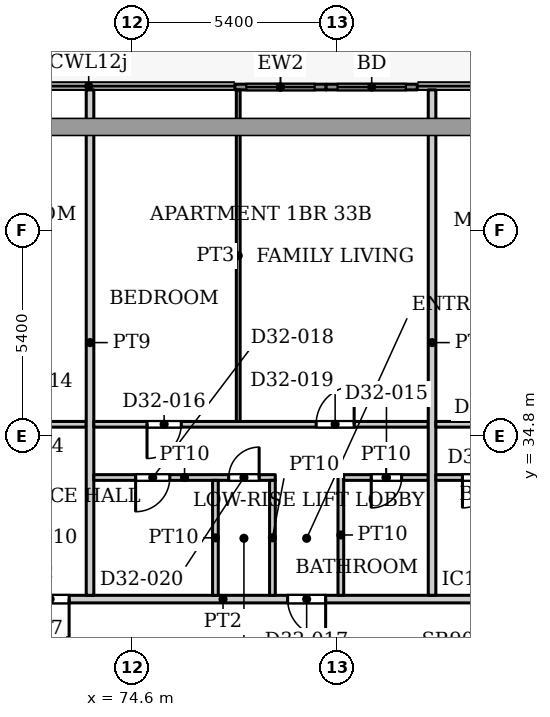
"""IFC4 building model, lengths in metres.
Left out: names, types, materials, properties, quantities, classifications, styles, units other than length and angle.
Written with IfcOpenShell. Run it as: python <this file> out.ifc"""

import sys

from ifc_helpers import new_model, si_unit, direction, frame, frame_2d, origin, place, context, subcontext, project, spatial, rectangle, extrude, source, transform, mapped, element, fill, save


model = new_model("IFC4")
c1 = context("Model", 3, precision=1e-05, world=origin(), true_north=direction((0.0, 1.0)))
c2 = subcontext(c1, "Body", "Model", "MODEL_VIEW")
j1 = project(units=[si_unit("LENGTHUNIT", "METRE"), si_unit("PLANEANGLEUNIT", "RADIAN")], contexts=[c1])
p1 = place(None, origin())
s1 = spatial("IfcSite", under=j1, at=p1, CompositionType="ELEMENT")
p2 = place(p1, origin())
s2 = spatial("IfcBuilding", under=s1, at=p2, CompositionType="ELEMENT")
p3 = place(p2, frame((0.0, 0.0, 140.9)))
s3 = spatial("IfcBuildingStorey", under=s2, at=p3, CompositionType="ELEMENT", Elevation=140.9)
p4 = place(p3, frame((77.312, 43.975, 0.0), z_axis=(0.0, 0.0, 1.0), x_axis=(1.0, 0.0, 0.0)))
e1 = element("IfcWall", 1, at=p4, inside=s3, PredefinedType="SOLIDWALL", context=c2, shape_type="SweptSolid", body=[
    extrude(rectangle(XDim=2.4, YDim=0.15, at=frame_2d((1.2, 0.0))), origin(), (0.0, 0.0, 1.0), 3.75),
])
p5 = place(p4, frame((0.3, 0.0, 0.0)))
e2 = element("IfcOpeningElement", 2, at=p5, cuts=e1, PredefinedType="OPENING", context=c2, shape_type="SweptSolid", body=[
    extrude(rectangle(XDim=1.8, YDim=2.4, at=frame_2d((0.9, 1.2))), frame((0.0, 0.085, 0.0), z_axis=(0.0, -1.0, 0.0), x_axis=(1.0, 0.0, 0.0)), (0.0, 0.0, 1.0), 0.17),
])
p6 = place(p3, frame((79.712, 43.975, 0.0), z_axis=(0.0, 0.0, 1.0), x_axis=(1.0, 0.0, 0.0)))
e3 = element("IfcWall", 3, at=p6, inside=s3, PredefinedType="SOLIDWALL", context=c2, shape_type="SweptSolid", body=[
    extrude(rectangle(XDim=2.4, YDim=0.15, at=frame_2d((1.2, 0.0))), origin(), (0.0, 0.0, 1.0), 3.75),
])
p7 = place(p6, frame((0.3, 0.0, 0.0)))
e4 = element("IfcOpeningElement", 4, at=p7, cuts=e3, PredefinedType="OPENING", context=c2, shape_type="SweptSolid", body=[
    extrude(rectangle(XDim=1.8, YDim=2.4, at=frame_2d((0.9, 1.2))), frame((0.0, 0.085, 0.0), z_axis=(0.0, -1.0, 0.0), x_axis=(1.0, 0.0, 0.0)), (0.0, 0.0, 1.0), 0.17),
])
p8 = place(p3, frame((55.9, 30.5, 0.0), z_axis=(0.0, 0.0, 1.0), x_axis=(1.0, 0.0, 0.0)))
e5 = element("IfcWall", 5, at=p8, inside=s3, PredefinedType="PARTITIONING", context=c2, shape_type="SweptSolid", body=[
    extrude(rectangle(XDim=42.2, YDim=0.2, at=frame_2d((21.1, 0.0))), origin(), (0.0, 0.0, 1.0), 3.6),
])
p9 = place(p8, frame((16.05, 0.0, 0.0)))
e6 = element("IfcOpeningElement", 6, at=p9, cuts=e5, PredefinedType="OPENING", context=c2, shape_type="SweptSolid", body=[
    extrude(rectangle(XDim=1.0, YDim=2.1, at=frame_2d((0.5, 1.05))), frame((0.0, 0.11, 0.0), z_axis=(0.0, -1.0, 0.0), x_axis=(1.0, 0.0, 0.0)), (0.0, 0.0, 1.0), 0.22),
])
p10 = place(p8, frame((22.8, 0.0, 0.0)))
e7 = element("IfcOpeningElement", 7, at=p10, cuts=e5, PredefinedType="OPENING", context=c2, shape_type="SweptSolid", body=[
    extrude(rectangle(XDim=1.0, YDim=2.1, at=frame_2d((0.5, 1.05))), frame((0.0, 0.11, 0.0), z_axis=(0.0, -1.0, 0.0), x_axis=(1.0, 0.0, 0.0)), (0.0, 0.0, 1.0), 0.22),
])
p11 = place(p8, frame((29.55, 0.0, 0.0)))
e8 = element("IfcOpeningElement", 8, at=p11, cuts=e5, PredefinedType="OPENING", context=c2, shape_type="SweptSolid", body=[
    extrude(rectangle(XDim=1.0, YDim=2.1, at=frame_2d((0.5, 1.05))), frame((0.0, 0.11, 0.0), z_axis=(0.0, -1.0, 0.0), x_axis=(1.0, 0.0, 0.0)), (0.0, 0.0, 1.0), 0.22),
])
p12 = place(p3, frame((55.9, 35.1, 0.0), z_axis=(0.0, 0.0, 1.0), x_axis=(1.0, 0.0, 0.0)))
e9 = element("IfcWall", 9, at=p12, inside=s3, PredefinedType="PARTITIONING", context=c2, shape_type="SweptSolid", body=[
    extrude(rectangle(XDim=17.5, YDim=0.15, at=frame_2d((8.75, 0.0))), origin(), (0.0, 0.0, 1.0), 3.6),
])
p13 = place(p12, frame((0.95, 0.0, 0.0)))
e10 = element("IfcOpeningElement", 10, at=p13, cuts=e9, PredefinedType="OPENING", context=c2, shape_type="SweptSolid", body=[
    extrude(rectangle(XDim=0.9, YDim=2.1, at=frame_2d((0.45, 1.05))), frame((0.0, 0.085, 0.0), z_axis=(0.0, -1.0, 0.0), x_axis=(1.0, 0.0, 0.0)), (0.0, 0.0, 1.0), 0.17),
])
p14 = place(p12, frame((15.35, 0.0, 0.0)))
e11 = element("IfcOpeningElement", 11, at=p14, cuts=e9, PredefinedType="OPENING", context=c2, shape_type="SweptSolid", body=[
    extrude(rectangle(XDim=0.9, YDim=2.1, at=frame_2d((0.45, 1.05))), frame((0.0, 0.085, 0.0), z_axis=(0.0, -1.0, 0.0), x_axis=(1.0, 0.0, 0.0)), (0.0, 0.0, 1.0), 0.17),
])
p15 = place(p12, frame((7.5, 0.0, 0.0)))
e12 = element("IfcOpeningElement", 12, at=p15, cuts=e9, PredefinedType="OPENING", context=c2, shape_type="SweptSolid", body=[
    extrude(rectangle(XDim=1.0, YDim=2.1, at=frame_2d((0.5, 1.05))), frame((0.0, 0.085, 0.0), z_axis=(0.0, -1.0, 0.0), x_axis=(1.0, 0.0, 0.0)), (0.0, 0.0, 1.0), 0.17),
])
p16 = place(p12, frame((3.6, 0.0, 0.0)))
e13 = element("IfcOpeningElement", 13, at=p16, cuts=e9, PredefinedType="OPENING", context=c2, shape_type="SweptSolid", body=[
    extrude(rectangle(XDim=1.6, YDim=2.1, at=frame_2d((0.8, 1.05))), frame((0.0, 0.085, 0.0), z_axis=(0.0, -1.0, 0.0), x_axis=(1.0, 0.0, 0.0)), (0.0, 0.0, 1.0), 0.17),
])
p17 = place(p12, frame((10.55, 0.0, 0.0)))
e14 = element("IfcOpeningElement", 14, at=p17, cuts=e9, PredefinedType="OPENING", context=c2, shape_type="SweptSolid", body=[
    extrude(rectangle(XDim=0.9, YDim=2.1, at=frame_2d((0.45, 1.05))), frame((0.0, 0.085, 0.0), z_axis=(0.0, -1.0, 0.0), x_axis=(1.0, 0.0, 0.0)), (0.0, 0.0, 1.0), 0.17),
])
p18 = place(p3, frame((73.5, 30.6, 0.0), z_axis=(0.0, 0.0, 1.0), x_axis=(0.0, 1.0, 0.0)))
e15 = element("IfcWall", 15, at=p18, inside=s3, PredefinedType="PARTITIONING", context=c2, shape_type="SweptSolid", body=[
    extrude(rectangle(XDim=13.3, YDim=0.2, at=frame_2d((6.65, 0.0))), origin(), (0.0, 0.0, 1.0), 3.6),
])
p19 = place(p3, frame((73.6, 33.7, 0.0), z_axis=(0.0, 0.0, 1.0), x_axis=(1.0, 0.0, 0.0)))
e16 = element("IfcWall", 16, at=p19, inside=s3, PredefinedType="PARTITIONING", context=c2, shape_type="SweptSolid", body=[
    extrude(rectangle(XDim=4.775, YDim=0.15, at=frame_2d((2.387, 0.0))), origin(), (0.0, 0.0, 1.0), 3.6),
])
p20 = place(p19, frame((1.1, 0.0, 0.0)))
e17 = element("IfcOpeningElement", 17, at=p20, cuts=e16, PredefinedType="OPENING", context=c2, shape_type="SweptSolid", body=[
    extrude(rectangle(XDim=0.9, YDim=2.1, at=frame_2d((0.45, 1.05))), frame((0.0, 0.085, 0.0), z_axis=(0.0, -1.0, 0.0), x_axis=(1.0, 0.0, 0.0)), (0.0, 0.0, 1.0), 0.17),
])
p21 = place(p19, frame((3.55, 0.0, 0.0)))
e18 = element("IfcOpeningElement", 18, at=p21, cuts=e16, PredefinedType="OPENING", context=c2, shape_type="SweptSolid", body=[
    extrude(rectangle(XDim=0.8, YDim=2.1, at=frame_2d((0.4, 1.05))), frame((0.0, 0.085, 0.0), z_axis=(0.0, -1.0, 0.0), x_axis=(1.0, 0.0, 0.0)), (0.0, 0.0, 1.0), 0.17),
])
p22 = place(p3, frame((73.6, 35.1, 0.0), z_axis=(0.0, 0.0, 1.0), x_axis=(1.0, 0.0, 0.0)))
e19 = element("IfcWall", 19, at=p22, inside=s3, PredefinedType="PARTITIONING", context=c2, shape_type="SweptSolid", body=[
    extrude(rectangle(XDim=8.8, YDim=0.15, at=frame_2d((4.4, 0.0))), origin(), (0.0, 0.0, 1.0), 3.6),
])
p23 = place(p22, frame((1.4, 0.0, 0.0)))
e20 = element("IfcOpeningElement", 20, at=p23, cuts=e19, PredefinedType="OPENING", context=c2, shape_type="SweptSolid", body=[
    extrude(rectangle(XDim=0.9, YDim=2.1, at=frame_2d((0.45, 1.05))), frame((0.0, 0.085, 0.0), z_axis=(0.0, -1.0, 0.0), x_axis=(1.0, 0.0, 0.0)), (0.0, 0.0, 1.0), 0.17),
])
p24 = place(p22, frame((5.85, 0.0, 0.0)))
e21 = element("IfcOpeningElement", 21, at=p24, cuts=e19, PredefinedType="OPENING", context=c2, shape_type="SweptSolid", body=[
    extrude(rectangle(XDim=1.0, YDim=2.1, at=frame_2d((0.5, 1.05))), frame((0.0, 0.085, 0.0), z_axis=(0.0, -1.0, 0.0), x_axis=(1.0, 0.0, 0.0)), (0.0, 0.0, 1.0), 0.17),
])
p25 = place(p3, frame((76.8, 30.6, 0.0), z_axis=(0.0, 0.0, 1.0), x_axis=(0.0, 1.0, 0.0)))
e22 = element("IfcWall", 22, at=p25, inside=s3, PredefinedType="PARTITIONING", context=c2, shape_type="SweptSolid", body=[
    extrude(rectangle(XDim=3.025, YDim=0.15, at=frame_2d((1.512, 0.0))), origin(), (0.0, 0.0, 1.0), 3.6),
])
p26 = place(p3, frame((77.4, 35.175, 0.0), z_axis=(0.0, 0.0, 1.0), x_axis=(0.0, 1.0, 0.0)))
e23 = element("IfcWall", 23, at=p26, inside=s3, PredefinedType="PARTITIONING", context=c2, shape_type="SweptSolid", body=[
    extrude(rectangle(XDim=8.725, YDim=0.1, at=frame_2d((4.362, 0.0))), origin(), (0.0, 0.0, 1.0), 3.6),
])
p27 = place(p3, frame((78.3, 30.6, 0.0), z_axis=(0.0, 0.0, 1.0), x_axis=(0.0, 1.0, 0.0)))
e24 = element("IfcWall", 24, at=p27, inside=s3, PredefinedType="PARTITIONING", context=c2, shape_type="SweptSolid", body=[
    extrude(rectangle(XDim=3.025, YDim=0.15, at=frame_2d((1.512, 0.0))), origin(), (0.0, 0.0, 1.0), 3.6),
])
p28 = place(p3, frame((80.1, 30.6, 0.0), z_axis=(0.0, 0.0, 1.0), x_axis=(0.0, 1.0, 0.0)))
e25 = element("IfcWall", 25, at=p28, inside=s3, PredefinedType="PARTITIONING", context=c2, shape_type="SweptSolid", body=[
    extrude(rectangle(XDim=3.175, YDim=0.15, at=frame_2d((1.587, 0.0))), origin(), (0.0, 0.0, 1.0), 3.6),
])
p29 = place(p3, frame((80.175, 33.7, 0.0), z_axis=(0.0, 0.0, 1.0), x_axis=(1.0, 0.0, 0.0)))
e26 = element("IfcWall", 26, at=p29, inside=s3, PredefinedType="PARTITIONING", context=c2, shape_type="SweptSolid", body=[
    extrude(rectangle(XDim=2.225, YDim=0.15, at=frame_2d((1.112, 0.0))), origin(), (0.0, 0.0, 1.0), 3.6),
])
p30 = place(p29, frame((0.725, 0.0, 0.0)))
e27 = element("IfcOpeningElement", 27, at=p30, cuts=e26, PredefinedType="OPENING", context=c2, shape_type="SweptSolid", body=[
    extrude(rectangle(XDim=0.8, YDim=2.1, at=frame_2d((0.4, 1.05))), frame((0.0, 0.085, 0.0), z_axis=(0.0, -1.0, 0.0), x_axis=(1.0, 0.0, 0.0)), (0.0, 0.0, 1.0), 0.17),
])
p31 = place(p3, frame((82.5, 30.6, 0.0), z_axis=(0.0, 0.0, 1.0), x_axis=(0.0, 1.0, 0.0)))
e28 = element("IfcWall", 28, at=p31, inside=s3, PredefinedType="PARTITIONING", context=c2, shape_type="SweptSolid", body=[
    extrude(rectangle(XDim=13.3, YDim=0.2, at=frame_2d((6.65, 0.0))), origin(), (0.0, 0.0, 1.0), 3.6),
])
p32 = place(p3, frame((82.6, 33.7, 0.0), z_axis=(0.0, 0.0, 1.0), x_axis=(1.0, 0.0, 0.0)))
e29 = element("IfcWall", 29, at=p32, inside=s3, PredefinedType="PARTITIONING", context=c2, shape_type="SweptSolid", body=[
    extrude(rectangle(XDim=2.225, YDim=0.15, at=frame_2d((1.112, 0.0))), origin(), (0.0, 0.0, 1.0), 3.6),
])
p33 = place(p32, frame((0.7, 0.0, 0.0)))
e30 = element("IfcOpeningElement", 30, at=p33, cuts=e29, PredefinedType="OPENING", context=c2, shape_type="SweptSolid", body=[
    extrude(rectangle(XDim=0.8, YDim=2.1, at=frame_2d((0.4, 1.05))), frame((0.0, 0.085, 0.0), z_axis=(0.0, -1.0, 0.0), x_axis=(1.0, 0.0, 0.0)), (0.0, 0.0, 1.0), 0.17),
])
p34 = place(p3, frame((82.6, 35.1, 0.0), z_axis=(0.0, 0.0, 1.0), x_axis=(1.0, 0.0, 0.0)))
e31 = element("IfcWall", 31, at=p34, inside=s3, PredefinedType="PARTITIONING", context=c2, shape_type="SweptSolid", body=[
    extrude(rectangle(XDim=17.3, YDim=0.15, at=frame_2d((8.65, 0.0))), origin(), (0.0, 0.0, 1.0), 3.6),
])
p35 = place(p34, frame((4.85, 0.0, 0.0)))
e32 = element("IfcOpeningElement", 32, at=p35, cuts=e31, PredefinedType="OPENING", context=c2, shape_type="SweptSolid", body=[
    extrude(rectangle(XDim=0.9, YDim=2.1, at=frame_2d((0.45, 1.05))), frame((0.0, 0.085, 0.0), z_axis=(0.0, -1.0, 0.0), x_axis=(1.0, 0.0, 0.0)), (0.0, 0.0, 1.0), 0.17),
])
p36 = place(p34, frame((11.15, 0.0, 0.0)))
e33 = element("IfcOpeningElement", 33, at=p36, cuts=e31, PredefinedType="OPENING", context=c2, shape_type="SweptSolid", body=[
    extrude(rectangle(XDim=0.9, YDim=2.1, at=frame_2d((0.45, 1.05))), frame((0.0, 0.085, 0.0), z_axis=(0.0, -1.0, 0.0), x_axis=(1.0, 0.0, 0.0)), (0.0, 0.0, 1.0), 0.17),
])
p37 = place(p34, frame((7.65, 0.0, 0.0)))
e34 = element("IfcOpeningElement", 34, at=p37, cuts=e31, PredefinedType="OPENING", context=c2, shape_type="SweptSolid", body=[
    extrude(rectangle(XDim=1.0, YDim=2.1, at=frame_2d((0.5, 1.05))), frame((0.0, 0.085, 0.0), z_axis=(0.0, -1.0, 0.0), x_axis=(1.0, 0.0, 0.0)), (0.0, 0.0, 1.0), 0.17),
])
p38 = place(p34, frame((1.2, 0.0, 0.0)))
e35 = element("IfcOpeningElement", 35, at=p38, cuts=e31, PredefinedType="OPENING", context=c2, shape_type="SweptSolid", body=[
    extrude(rectangle(XDim=1.6, YDim=2.1, at=frame_2d((0.8, 1.05))), frame((0.0, 0.085, 0.0), z_axis=(0.0, -1.0, 0.0), x_axis=(1.0, 0.0, 0.0)), (0.0, 0.0, 1.0), 0.17),
])
p39 = place(p34, frame((15.95, 0.0, 0.0)))
e36 = element("IfcOpeningElement", 36, at=p39, cuts=e31, PredefinedType="OPENING", context=c2, shape_type="SweptSolid", body=[
    extrude(rectangle(XDim=0.9, YDim=2.1, at=frame_2d((0.45, 1.05))), frame((0.0, 0.085, 0.0), z_axis=(0.0, -1.0, 0.0), x_axis=(1.0, 0.0, 0.0)), (0.0, 0.0, 1.0), 0.17),
])
m1 = source(origin(), c2, "Body", "SweptSolid", [
    extrude(rectangle(XDim=1.8, YDim=2.4, at=frame_2d((0.9, 1.2))), frame((0.0, 0.025, 0.0), z_axis=(0.0, -1.0, 0.0), x_axis=(1.0, 0.0, 0.0)), (0.0, 0.0, 1.0), 0.05),
])
p40 = place(p5, origin())
e37 = element("IfcDoor", 37, at=p40, inside=s3, OperationType="SLIDING_TO_LEFT", PredefinedType="DOOR", context=c2, shape_type="MappedRepresentation", body=[
    mapped(m1, transform((0.0, 0.0, 0.0), x_axis=(1.0, 0.0, 0.0), y_axis=(0.0, 1.0, 0.0), z_axis=(0.0, 0.0, 1.0), scale=1.0)),
])
fill(e2, e37)
p41 = place(p7, origin())
e38 = element("IfcDoor", 38, at=p41, inside=s3, OperationType="SLIDING_TO_LEFT", PredefinedType="DOOR", context=c2, shape_type="MappedRepresentation", body=[
    mapped(m1, transform((0.0, 0.0, 0.0), x_axis=(1.0, 0.0, 0.0), y_axis=(0.0, 1.0, 0.0), z_axis=(0.0, 0.0, 1.0), scale=1.0)),
])
fill(e4, e38)
m2 = source(origin(), c2, "Body", "SweptSolid", [
    extrude(rectangle(XDim=1.0, YDim=2.1, at=frame_2d((0.5, 1.05))), frame((0.0, 0.025, 0.0), z_axis=(0.0, -1.0, 0.0), x_axis=(1.0, 0.0, 0.0)), (0.0, 0.0, 1.0), 0.05),
])
p42 = place(p9, origin())
e39 = element("IfcDoor", 39, at=p42, inside=s3, OperationType="SINGLE_SWING_RIGHT", PredefinedType="DOOR", context=c2, shape_type="MappedRepresentation", body=[
    mapped(m2, transform((0.0, 0.0, 0.0), x_axis=(1.0, 0.0, 0.0), y_axis=(0.0, 1.0, 0.0), z_axis=(0.0, 0.0, 1.0), scale=1.0)),
])
fill(e6, e39)
m3 = source(origin(), c2, "Body", "SweptSolid", [
    extrude(rectangle(XDim=0.8, YDim=2.1, at=frame_2d((0.4, 1.05))), frame((0.0, 0.025, 0.0), z_axis=(0.0, -1.0, 0.0), x_axis=(1.0, 0.0, 0.0)), (0.0, 0.0, 1.0), 0.05),
])
p43 = place(p30, origin())
e40 = element("IfcDoor", 40, at=p43, inside=s3, OperationType="SINGLE_SWING_RIGHT", PredefinedType="DOOR", context=c2, shape_type="MappedRepresentation", body=[
    mapped(m3, transform((0.0, 0.0, 0.0), x_axis=(1.0, 0.0, 0.0), y_axis=(0.0, 1.0, 0.0), z_axis=(0.0, 0.0, 1.0), scale=1.0)),
])
fill(e27, e40)
m4 = source(origin(), c2, "Body", "SweptSolid", [
    extrude(rectangle(XDim=0.9, YDim=2.1, at=frame_2d((0.45, 1.05))), frame((0.0, 0.025, 0.0), z_axis=(0.0, -1.0, 0.0), x_axis=(1.0, 0.0, 0.0)), (0.0, 0.0, 1.0), 0.05),
])
p44 = place(p23, origin())
e41 = element("IfcDoor", 41, at=p44, inside=s3, OperationType="SINGLE_SWING_RIGHT", PredefinedType="DOOR", context=c2, shape_type="MappedRepresentation", body=[
    mapped(m4, transform((0.0, 0.0, 0.0), x_axis=(1.0, 0.0, 0.0), y_axis=(0.0, 1.0, 0.0), z_axis=(0.0, 0.0, 1.0), scale=1.0)),
])
fill(e20, e41)
p45 = place(p10, origin())
e42 = element("IfcDoor", 42, at=p45, inside=s3, OperationType="SINGLE_SWING_RIGHT", PredefinedType="DOOR", context=c2, shape_type="MappedRepresentation", body=[
    mapped(m2, transform((0.0, 0.0, 0.0), x_axis=(1.0, 0.0, 0.0), y_axis=(0.0, 1.0, 0.0), z_axis=(0.0, 0.0, 1.0), scale=1.0)),
])
fill(e7, e42)
p46 = place(p20, origin())
e43 = element("IfcDoor", 43, at=p46, inside=s3, OperationType="SINGLE_SWING_RIGHT", PredefinedType="DOOR", context=c2, shape_type="MappedRepresentation", body=[
    mapped(m4, transform((0.0, 0.0, 0.0), x_axis=(1.0, 0.0, 0.0), y_axis=(0.0, 1.0, 0.0), z_axis=(0.0, 0.0, 1.0), scale=1.0)),
])
fill(e17, e43)
m5 = source(origin(), c2, "Body", "SweptSolid", [
    extrude(rectangle(XDim=1.0, YDim=2.1, at=frame_2d((0.5, 1.05))), frame((0.0, 0.025, 0.0), z_axis=(0.0, -1.0, 0.0), x_axis=(1.0, 0.0, 0.0)), (0.0, 0.0, 1.0), 0.05),
])
p47 = place(p24, origin())
e44 = element("IfcDoor", 44, at=p47, inside=s3, OperationType="SINGLE_SWING_LEFT", PredefinedType="DOOR", context=c2, shape_type="MappedRepresentation", body=[
    mapped(m5, transform((0.0, 0.0, 0.0), x_axis=(1.0, 0.0, 0.0), y_axis=(0.0, 1.0, 0.0), z_axis=(0.0, 0.0, 1.0), scale=1.0)),
])
fill(e21, e44)
p48 = place(p21, origin())
e45 = element("IfcDoor", 45, at=p48, inside=s3, OperationType="SINGLE_SWING_LEFT", PredefinedType="DOOR", context=c2, shape_type="MappedRepresentation", body=[
    mapped(m3, transform((0.0, 0.0, 0.0), x_axis=(1.0, 0.0, 0.0), y_axis=(0.0, 1.0, 0.0), z_axis=(0.0, 0.0, 1.0), scale=1.0)),
])
fill(e18, e45)
p49 = place(p33, origin())
e46 = element("IfcDoor", 46, at=p49, inside=s3, OperationType="SINGLE_SWING_RIGHT", PredefinedType="DOOR", context=c2, shape_type="MappedRepresentation", body=[
    mapped(m3, transform((0.0, 0.0, 0.0), x_axis=(1.0, 0.0, 0.0), y_axis=(0.0, 1.0, 0.0), z_axis=(0.0, 0.0, 1.0), scale=1.0)),
])
fill(e30, e46)
save(model, sys.argv[1])
